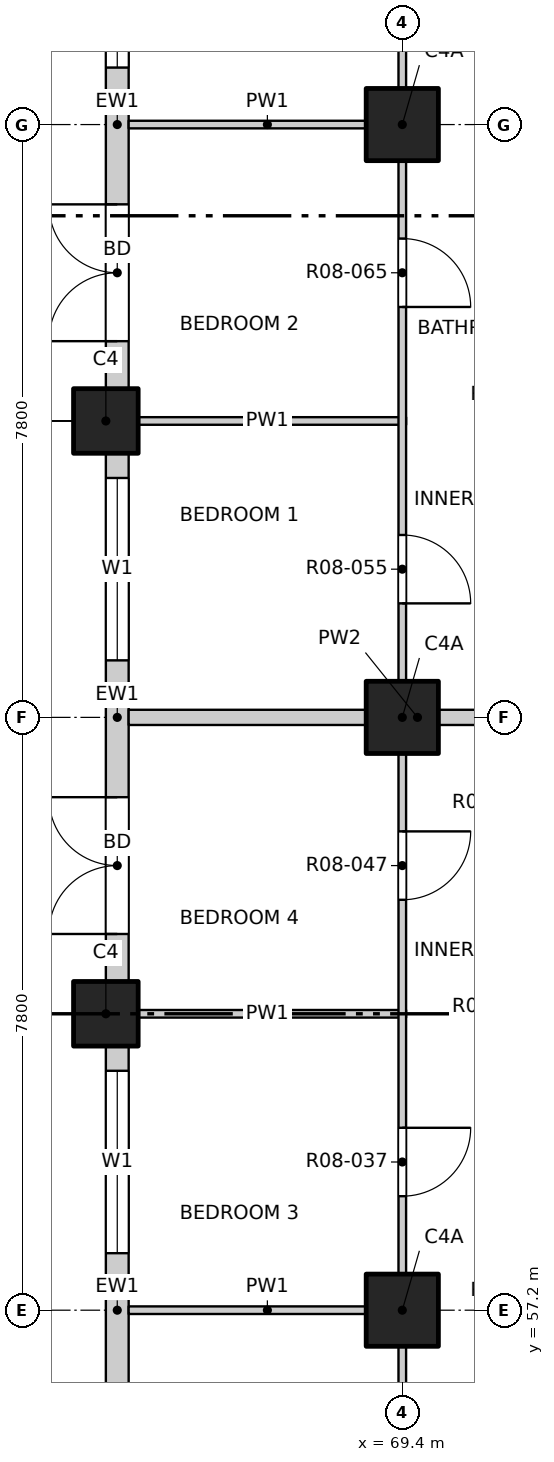
"""IFC4 building model, lengths in metres.
Left out: names, types, materials, properties, quantities, classifications, styles, units other than length and angle.
Written with IfcOpenShell. Run it as: python <this file> out.ifc"""

import sys

from ifc_helpers import new_model, si_unit, direction, frame, frame_2d, origin, origin_2d, place, context, subcontext, project, spatial, rectangle, extrude, element, fill, save


model = new_model("IFC4")
c1 = context("Model", 3, precision=1e-05, world=origin(), true_north=direction((0.0, 1.0)))
c2 = subcontext(c1, "Body", "Model", "MODEL_VIEW")
j1 = project(units=[si_unit("LENGTHUNIT", "METRE"), si_unit("PLANEANGLEUNIT", "RADIAN")], contexts=[c1])
p1 = place(None, origin())
s1 = spatial("IfcSite", under=j1, at=p1, CompositionType="ELEMENT")
p2 = place(p1, origin())
s2 = spatial("IfcBuilding", under=s1, at=p2, CompositionType="ELEMENT")
p3 = place(p2, frame((0.0, 0.0, 99.9)))
s3 = spatial("IfcBuildingStorey", under=s2, at=p3, CompositionType="ELEMENT", Elevation=99.9)
for number, where, z_axis, x_axis in (
    (1, (65.5, 61.1, -0.3), (0.0, 0.0, 1.0), (1.0, 0.0, 0.0)),
    (2, (65.5, 68.9, -0.3), (0.0, 0.0, 1.0), (1.0, 0.0, 0.0)),
):
    element("IfcColumn", number, at=place(p3, frame(where, z_axis=z_axis, x_axis=x_axis)), inside=s3, PredefinedType="COLUMN", context=c2, shape_type="SweptSolid", body=[
        extrude(rectangle(XDim=0.85, YDim=0.85, at=origin_2d()), origin(), (0.0, 0.0, 1.0), 3.45),
    ])
for number, where, z_axis, x_axis in (
    (3, (69.4, 57.2, -0.3), (0.0, 0.0, 1.0), (1.0, 0.0, 0.0)),
    (4, (69.4, 65.0, -0.3), (0.0, 0.0, 1.0), (1.0, 0.0, 0.0)),
    (5, (69.4, 72.8, -0.3), (0.0, 0.0, 1.0), (1.0, 0.0, 0.0)),
):
    element("IfcColumn", number, at=place(p3, frame(where, z_axis=z_axis, x_axis=x_axis)), inside=s3, PredefinedType="COLUMN", context=c2, shape_type="SweptSolid", body=[
        extrude(rectangle(XDim=0.95, YDim=0.95, at=origin_2d()), origin(), (0.0, 0.0, 1.0), 3.45),
    ])
p4 = place(p3, frame((65.65, 53.725, 0.0), z_axis=(0.0, 0.0, 1.0), x_axis=(0.0, 1.0, 0.0)))
e6 = element("IfcWall", 6, at=p4, inside=s3, PredefinedType="SOLIDWALL", context=c2, shape_type="SweptSolid", body=[
    extrude(rectangle(XDim=6.95, YDim=0.3, at=frame_2d((3.475, 0.0))), origin(), (0.0, 0.0, 1.0), 2.7),
])
p5 = place(p4, frame((0.625, 0.0, 0.0)))
e7 = element("IfcOpeningElement", 7, at=p5, cuts=e6, PredefinedType="OPENING", context=c2, shape_type="SweptSolid", body=[
    extrude(rectangle(XDim=1.8, YDim=2.4, at=frame_2d((0.9, 1.2))), frame((0.0, 0.16, 0.0), z_axis=(0.0, -1.0, 0.0), x_axis=(1.0, 0.0, 0.0)), (0.0, 0.0, 1.0), 0.32),
])
p6 = place(p4, frame((4.225, 0.0, 0.9)))
e8 = element("IfcOpeningElement", 8, at=p6, cuts=e6, PredefinedType="OPENING", context=c2, shape_type="SweptSolid", body=[
    extrude(rectangle(XDim=2.4, YDim=1.8, at=frame_2d((1.2, 0.9))), frame((0.0, 0.16, 0.0), z_axis=(0.0, -1.0, 0.0), x_axis=(1.0, 0.0, 0.0)), (0.0, 0.0, 1.0), 0.32),
])
p7 = place(p3, frame((65.65, 61.525, 0.0), z_axis=(0.0, 0.0, 1.0), x_axis=(0.0, 1.0, 0.0)))
e9 = element("IfcWall", 9, at=p7, inside=s3, PredefinedType="SOLIDWALL", context=c2, shape_type="SweptSolid", body=[
    extrude(rectangle(XDim=6.95, YDim=0.3, at=frame_2d((3.475, 0.0))), origin(), (0.0, 0.0, 1.0), 2.7),
])
p8 = place(p7, frame((0.625, 0.0, 0.0)))
e10 = element("IfcOpeningElement", 10, at=p8, cuts=e9, PredefinedType="OPENING", context=c2, shape_type="SweptSolid", body=[
    extrude(rectangle(XDim=1.8, YDim=2.4, at=frame_2d((0.9, 1.2))), frame((0.0, 0.16, 0.0), z_axis=(0.0, -1.0, 0.0), x_axis=(1.0, 0.0, 0.0)), (0.0, 0.0, 1.0), 0.32),
])
p9 = place(p7, frame((4.225, 0.0, 0.9)))
e11 = element("IfcOpeningElement", 11, at=p9, cuts=e9, PredefinedType="OPENING", context=c2, shape_type="SweptSolid", body=[
    extrude(rectangle(XDim=2.4, YDim=1.8, at=frame_2d((1.2, 0.9))), frame((0.0, 0.16, 0.0), z_axis=(0.0, -1.0, 0.0), x_axis=(1.0, 0.0, 0.0)), (0.0, 0.0, 1.0), 0.32),
])
p10 = place(p3, frame((65.65, 69.325, 0.0), z_axis=(0.0, 0.0, 1.0), x_axis=(0.0, 1.0, 0.0)))
e12 = element("IfcWall", 12, at=p10, inside=s3, PredefinedType="SOLIDWALL", context=c2, shape_type="SweptSolid", body=[
    extrude(rectangle(XDim=6.95, YDim=0.3, at=frame_2d((3.475, 0.0))), origin(), (0.0, 0.0, 1.0), 2.7),
])
p11 = place(p10, frame((0.625, 0.0, 0.0)))
e13 = element("IfcOpeningElement", 13, at=p11, cuts=e12, PredefinedType="OPENING", context=c2, shape_type="SweptSolid", body=[
    extrude(rectangle(XDim=1.8, YDim=2.4, at=frame_2d((0.9, 1.2))), frame((0.0, 0.16, 0.0), z_axis=(0.0, -1.0, 0.0), x_axis=(1.0, 0.0, 0.0)), (0.0, 0.0, 1.0), 0.32),
])
p12 = place(p10, frame((4.225, 0.0, 0.9)))
e14 = element("IfcOpeningElement", 14, at=p12, cuts=e12, PredefinedType="OPENING", context=c2, shape_type="SweptSolid", body=[
    extrude(rectangle(XDim=2.4, YDim=1.8, at=frame_2d((1.2, 0.9))), frame((0.0, 0.16, 0.0), z_axis=(0.0, -1.0, 0.0), x_axis=(1.0, 0.0, 0.0)), (0.0, 0.0, 1.0), 0.32),
])
p13 = place(p3, frame((65.8, 57.2, 0.0), z_axis=(0.0, 0.0, 1.0), x_axis=(1.0, 0.0, 0.0)))
e15 = element("IfcWall", 15, at=p13, inside=s3, PredefinedType="PARTITIONING", context=c2, shape_type="SweptSolid", body=[
    extrude(rectangle(XDim=3.65, YDim=0.1, at=frame_2d((1.825, 0.0))), origin(), (0.0, 0.0, 1.0), 3.15),
])
p14 = place(p3, frame((65.8, 61.1, 0.0), z_axis=(0.0, 0.0, 1.0), x_axis=(1.0, 0.0, 0.0)))
e16 = element("IfcWall", 16, at=p14, inside=s3, PredefinedType="PARTITIONING", context=c2, shape_type="SweptSolid", body=[
    extrude(rectangle(XDim=3.65, YDim=0.1, at=frame_2d((1.825, 0.0))), origin(), (0.0, 0.0, 1.0), 2.55),
])
p15 = place(p3, frame((65.8, 65.0, 0.0), z_axis=(0.0, 0.0, 1.0), x_axis=(1.0, 0.0, 0.0)))
e17 = element("IfcWall", 17, at=p15, inside=s3, PredefinedType="PARTITIONING", context=c2, shape_type="SweptSolid", body=[
    extrude(rectangle(XDim=7.6, YDim=0.2, at=frame_2d((3.8, 0.0))), origin(), (0.0, 0.0, 1.0), 3.15),
])
p16 = place(p3, frame((65.8, 68.9, 0.0), z_axis=(0.0, 0.0, 1.0), x_axis=(1.0, 0.0, 0.0)))
e18 = element("IfcWall", 18, at=p16, inside=s3, PredefinedType="PARTITIONING", context=c2, shape_type="SweptSolid", body=[
    extrude(rectangle(XDim=3.65, YDim=0.1, at=frame_2d((1.825, 0.0))), origin(), (0.0, 0.0, 1.0), 2.55),
])
p17 = place(p3, frame((65.8, 72.8, 0.0), z_axis=(0.0, 0.0, 1.0), x_axis=(1.0, 0.0, 0.0)))
e19 = element("IfcWall", 19, at=p17, inside=s3, PredefinedType="PARTITIONING", context=c2, shape_type="SweptSolid", body=[
    extrude(rectangle(XDim=3.65, YDim=0.1, at=frame_2d((1.825, 0.0))), origin(), (0.0, 0.0, 1.0), 3.15),
])
p18 = place(p3, frame((69.4, 45.8, 0.0), z_axis=(0.0, 0.0, 1.0), x_axis=(0.0, 1.0, 0.0)))
e20 = element("IfcWall", 20, at=p18, inside=s3, PredefinedType="PARTITIONING", context=c2, shape_type="SweptSolid", body=[
    extrude(rectangle(XDim=38.4, YDim=0.1, at=frame_2d((19.2, 0.0))), origin(), (0.0, 0.0, 1.0), 3.15),
])
p19 = place(p18, frame((1.05, 0.0, 0.0)))
e21 = element("IfcOpeningElement", 21, at=p19, cuts=e20, PredefinedType="OPENING", context=c2, shape_type="SweptSolid", body=[
    extrude(rectangle(XDim=1.2, YDim=2.1, at=frame_2d((0.6, 1.05))), frame((0.0, 0.06, 0.0), z_axis=(0.0, -1.0, 0.0), x_axis=(1.0, 0.0, 0.0)), (0.0, 0.0, 1.0), 0.12),
])
p20 = place(p18, frame((5.1, 0.0, 0.0)))
e22 = element("IfcOpeningElement", 22, at=p20, cuts=e20, PredefinedType="OPENING", context=c2, shape_type="SweptSolid", body=[
    extrude(rectangle(XDim=0.9, YDim=2.1, at=frame_2d((0.45, 1.05))), frame((0.0, 0.06, 0.0), z_axis=(0.0, -1.0, 0.0), x_axis=(1.0, 0.0, 0.0)), (0.0, 0.0, 1.0), 0.12),
])
p21 = place(p18, frame((9.0, 0.0, 0.0)))
e23 = element("IfcOpeningElement", 23, at=p21, cuts=e20, PredefinedType="OPENING", context=c2, shape_type="SweptSolid", body=[
    extrude(rectangle(XDim=0.9, YDim=2.1, at=frame_2d((0.45, 1.05))), frame((0.0, 0.06, 0.0), z_axis=(0.0, -1.0, 0.0), x_axis=(1.0, 0.0, 0.0)), (0.0, 0.0, 1.0), 0.12),
])
p22 = place(p18, frame((12.9, 0.0, 0.0)))
e24 = element("IfcOpeningElement", 24, at=p22, cuts=e20, PredefinedType="OPENING", context=c2, shape_type="SweptSolid", body=[
    extrude(rectangle(XDim=0.9, YDim=2.1, at=frame_2d((0.45, 1.05))), frame((0.0, 0.06, 0.0), z_axis=(0.0, -1.0, 0.0), x_axis=(1.0, 0.0, 0.0)), (0.0, 0.0, 1.0), 0.12),
])
p23 = place(p18, frame((16.8, 0.0, 0.0)))
e25 = element("IfcOpeningElement", 25, at=p23, cuts=e20, PredefinedType="OPENING", context=c2, shape_type="SweptSolid", body=[
    extrude(rectangle(XDim=0.9, YDim=2.1, at=frame_2d((0.45, 1.05))), frame((0.0, 0.06, 0.0), z_axis=(0.0, -1.0, 0.0), x_axis=(1.0, 0.0, 0.0)), (0.0, 0.0, 1.0), 0.12),
])
p24 = place(p18, frame((20.7, 0.0, 0.0)))
e26 = element("IfcOpeningElement", 26, at=p24, cuts=e20, PredefinedType="OPENING", context=c2, shape_type="SweptSolid", body=[
    extrude(rectangle(XDim=0.9, YDim=2.1, at=frame_2d((0.45, 1.05))), frame((0.0, 0.06, 0.0), z_axis=(0.0, -1.0, 0.0), x_axis=(1.0, 0.0, 0.0)), (0.0, 0.0, 1.0), 0.12),
])
p25 = place(p18, frame((24.6, 0.0, 0.0)))
e27 = element("IfcOpeningElement", 27, at=p25, cuts=e20, PredefinedType="OPENING", context=c2, shape_type="SweptSolid", body=[
    extrude(rectangle(XDim=0.9, YDim=2.1, at=frame_2d((0.45, 1.05))), frame((0.0, 0.06, 0.0), z_axis=(0.0, -1.0, 0.0), x_axis=(1.0, 0.0, 0.0)), (0.0, 0.0, 1.0), 0.12),
])
p26 = place(p18, frame((28.5, 0.0, 0.0)))
e28 = element("IfcOpeningElement", 28, at=p26, cuts=e20, PredefinedType="OPENING", context=c2, shape_type="SweptSolid", body=[
    extrude(rectangle(XDim=0.9, YDim=2.1, at=frame_2d((0.45, 1.05))), frame((0.0, 0.06, 0.0), z_axis=(0.0, -1.0, 0.0), x_axis=(1.0, 0.0, 0.0)), (0.0, 0.0, 1.0), 0.12),
])
p27 = place(p18, frame((32.4, 0.0, 0.0)))
e29 = element("IfcOpeningElement", 29, at=p27, cuts=e20, PredefinedType="OPENING", context=c2, shape_type="SweptSolid", body=[
    extrude(rectangle(XDim=0.9, YDim=2.1, at=frame_2d((0.45, 1.05))), frame((0.0, 0.06, 0.0), z_axis=(0.0, -1.0, 0.0), x_axis=(1.0, 0.0, 0.0)), (0.0, 0.0, 1.0), 0.12),
])
p28 = place(p18, frame((36.15, 0.0, 0.0)))
e30 = element("IfcOpeningElement", 30, at=p28, cuts=e20, PredefinedType="OPENING", context=c2, shape_type="SweptSolid", body=[
    extrude(rectangle(XDim=1.2, YDim=2.1, at=frame_2d((0.6, 1.05))), frame((0.0, 0.06, 0.0), z_axis=(0.0, -1.0, 0.0), x_axis=(1.0, 0.0, 0.0)), (0.0, 0.0, 1.0), 0.12),
])
p29 = place(p6, origin())
e31 = element("IfcWindow", 31, at=p29, inside=s3, PartitioningType="DOUBLE_PANEL_VERTICAL", PredefinedType="WINDOW", context=c2, shape_type="SweptSolid", body=[
    extrude(rectangle(XDim=2.4, YDim=1.8, at=frame_2d((1.2, 0.9))), frame((0.0, 0.03, 0.0), z_axis=(0.0, -1.0, 0.0), x_axis=(1.0, 0.0, 0.0)), (0.0, 0.0, 1.0), 0.06),
])
fill(e8, e31)
p30 = place(p8, origin())
e32 = element("IfcDoor", 32, at=p30, inside=s3, OperationType="DOUBLE_DOOR_SINGLE_SWING", PredefinedType="DOOR", context=c2, shape_type="SweptSolid", body=[
    extrude(rectangle(XDim=1.8, YDim=2.4, at=frame_2d((0.9, 1.2))), frame((0.0, 0.025, 0.0), z_axis=(0.0, -1.0, 0.0), x_axis=(1.0, 0.0, 0.0)), (0.0, 0.0, 1.0), 0.05),
])
fill(e10, e32)
p31 = place(p9, origin())
e33 = element("IfcWindow", 33, at=p31, inside=s3, PartitioningType="DOUBLE_PANEL_VERTICAL", PredefinedType="WINDOW", context=c2, shape_type="SweptSolid", body=[
    extrude(rectangle(XDim=2.4, YDim=1.8, at=frame_2d((1.2, 0.9))), frame((0.0, 0.03, 0.0), z_axis=(0.0, -1.0, 0.0), x_axis=(1.0, 0.0, 0.0)), (0.0, 0.0, 1.0), 0.06),
])
fill(e11, e33)
p32 = place(p11, origin())
e34 = element("IfcDoor", 34, at=p32, inside=s3, OperationType="DOUBLE_DOOR_SINGLE_SWING", PredefinedType="DOOR", context=c2, shape_type="SweptSolid", body=[
    extrude(rectangle(XDim=1.8, YDim=2.4, at=frame_2d((0.9, 1.2))), frame((0.0, 0.025, 0.0), z_axis=(0.0, -1.0, 0.0), x_axis=(1.0, 0.0, 0.0)), (0.0, 0.0, 1.0), 0.05),
])
fill(e13, e34)
p33 = place(p12, origin())
e35 = element("IfcWindow", 35, at=p33, inside=s3, PartitioningType="DOUBLE_PANEL_VERTICAL", PredefinedType="WINDOW", context=c2, shape_type="SweptSolid", body=[
    extrude(rectangle(XDim=2.4, YDim=1.8, at=frame_2d((1.2, 0.9))), frame((0.0, 0.03, 0.0), z_axis=(0.0, -1.0, 0.0), x_axis=(1.0, 0.0, 0.0)), (0.0, 0.0, 1.0), 0.06),
])
fill(e14, e35)
p34 = place(p22, origin())
e36 = element("IfcDoor", 36, at=p34, inside=s3, OperationType="SINGLE_SWING_LEFT", PredefinedType="DOOR", context=c2, shape_type="SweptSolid", body=[
    extrude(rectangle(XDim=0.9, YDim=2.1, at=frame_2d((0.45, 1.05))), frame((0.0, 0.025, 0.0), z_axis=(0.0, -1.0, 0.0), x_axis=(1.0, 0.0, 0.0)), (0.0, 0.0, 1.0), 0.05),
])
fill(e24, e36)
p35 = place(p23, origin())
e37 = element("IfcDoor", 37, at=p35, inside=s3, OperationType="SINGLE_SWING_LEFT", PredefinedType="DOOR", context=c2, shape_type="SweptSolid", body=[
    extrude(rectangle(XDim=0.9, YDim=2.1, at=frame_2d((0.45, 1.05))), frame((0.0, 0.025, 0.0), z_axis=(0.0, -1.0, 0.0), x_axis=(1.0, 0.0, 0.0)), (0.0, 0.0, 1.0), 0.05),
])
fill(e25, e37)
p36 = place(p24, origin())
e38 = element("IfcDoor", 38, at=p36, inside=s3, OperationType="SINGLE_SWING_RIGHT", PredefinedType="DOOR", context=c2, shape_type="SweptSolid", body=[
    extrude(rectangle(XDim=0.9, YDim=2.1, at=frame_2d((0.45, 1.05))), frame((0.0, 0.025, 0.0), z_axis=(0.0, -1.0, 0.0), x_axis=(1.0, 0.0, 0.0)), (0.0, 0.0, 1.0), 0.05),
])
fill(e26, e38)
p37 = place(p25, origin())
e39 = element("IfcDoor", 39, at=p37, inside=s3, OperationType="SINGLE_SWING_RIGHT", PredefinedType="DOOR", context=c2, shape_type="SweptSolid", body=[
    extrude(rectangle(XDim=0.9, YDim=2.1, at=frame_2d((0.45, 1.05))), frame((0.0, 0.025, 0.0), z_axis=(0.0, -1.0, 0.0), x_axis=(1.0, 0.0, 0.0)), (0.0, 0.0, 1.0), 0.05),
])
fill(e27, e39)
save(model, sys.argv[1])
